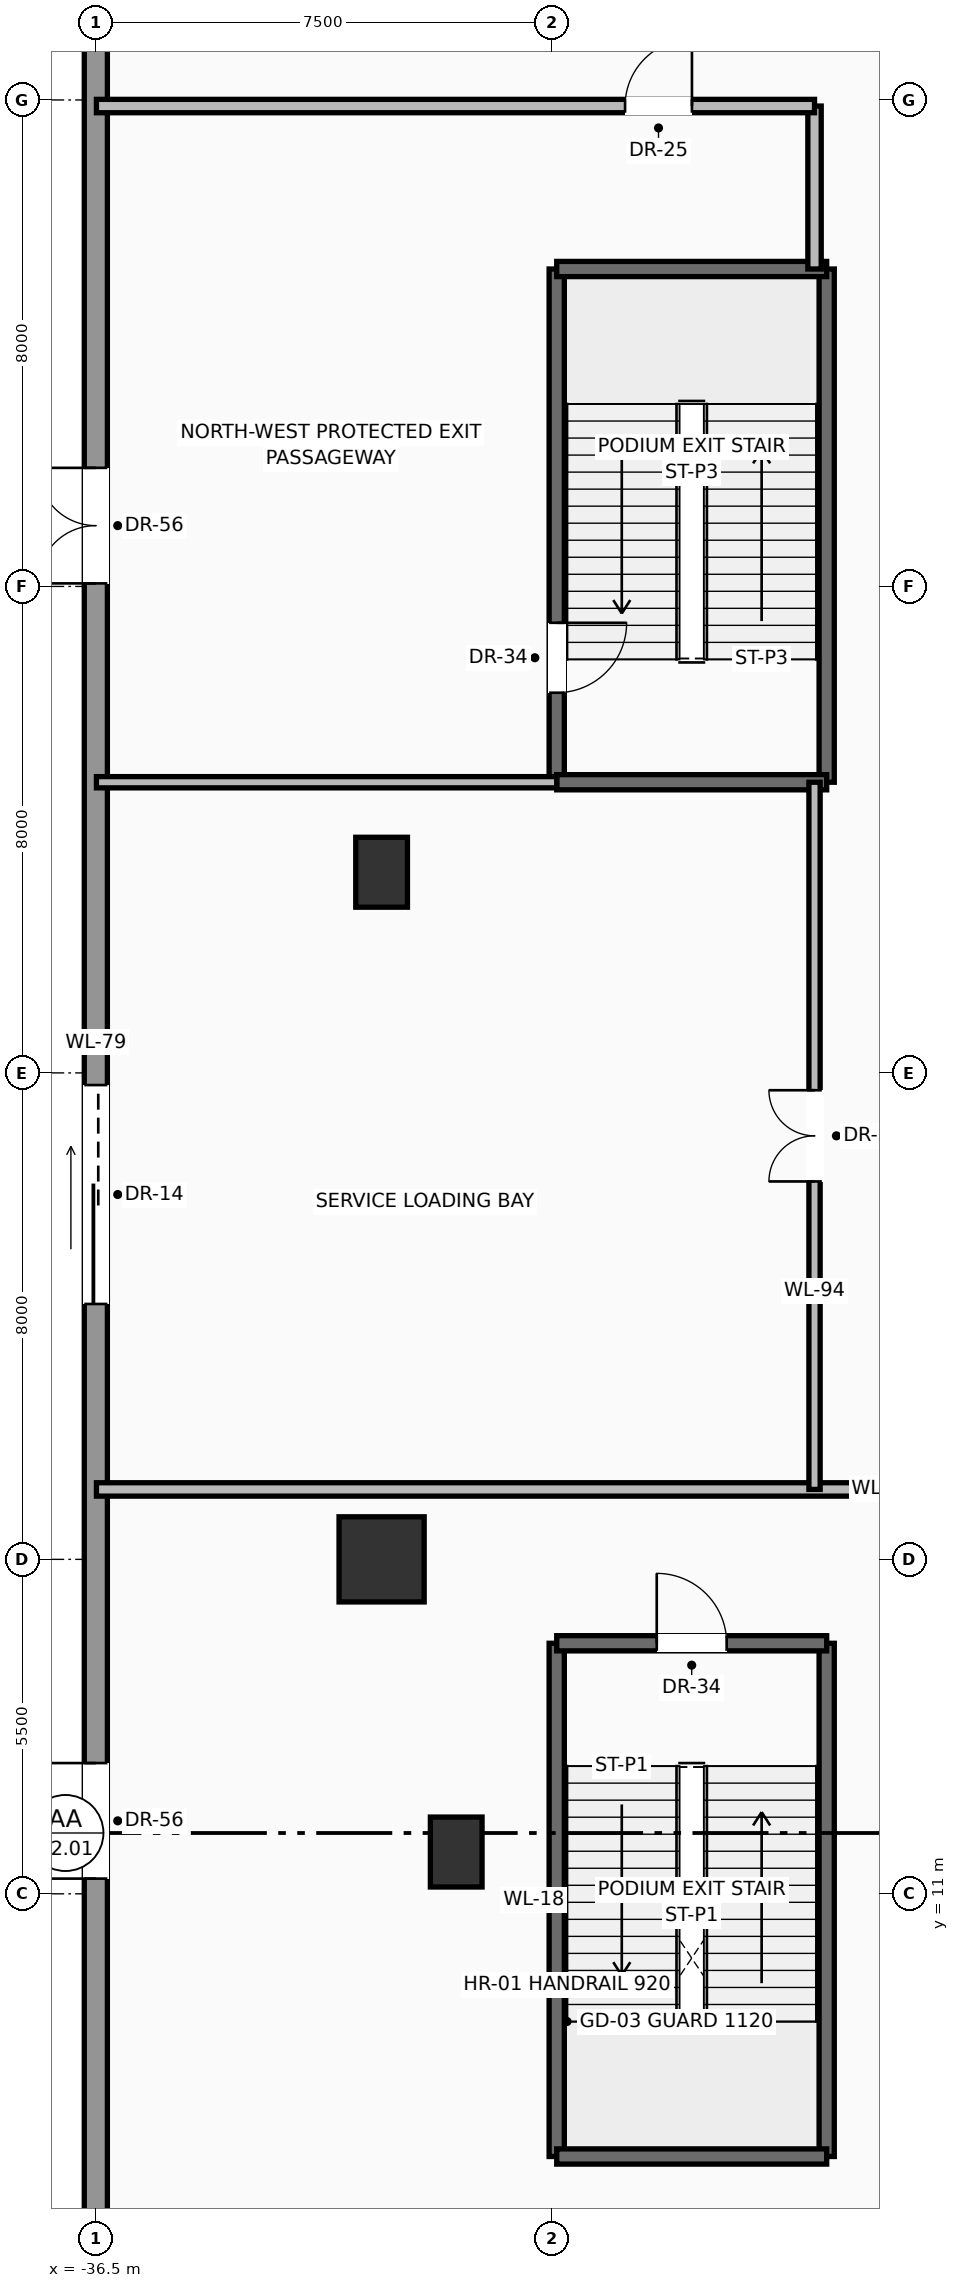
"""IFC4 building model, lengths in metres.
Left out: names, types, materials, properties, quantities, classifications, styles, units other than length and angle.
Written with IfcOpenShell. Run it as: python <this file> out.ifc"""

import sys

from ifc_helpers import new_model, si_unit, direction, frame, frame_2d, origin, origin_2d, place, context, subcontext, project, spatial, rectangle, hollow_rectangle, extrude, source, transform, mapped, element, fill, save


model = new_model("IFC4")
c1 = context("Model", 3, precision=1e-05, world=origin(), true_north=direction((0.0, 1.0)))
c2 = subcontext(c1, "Body", "Model", "MODEL_VIEW")
j1 = project(units=[si_unit("LENGTHUNIT", "METRE"), si_unit("PLANEANGLEUNIT", "RADIAN")], contexts=[c1])
p1 = place(None, origin())
s1 = spatial("IfcSite", under=j1, at=p1, CompositionType="ELEMENT")
p2 = place(p1, origin())
s2 = spatial("IfcBuilding", under=s1, at=p2, CompositionType="ELEMENT")
p3 = place(p2, origin())
s3 = spatial("IfcBuildingStorey", under=s2, at=p3, CompositionType="ELEMENT", Elevation=0.0)
m1 = source(origin(), c2, "Body", "SweptSolid", [
    extrude(hollow_rectangle(XDim=1.4, YDim=1.4, WallThickness=0.07, at=origin_2d()), origin(), (0.0, 0.0, 1.0), 5.5),
])
p4 = place(p3, frame((-31.8, 16.5, 0.0), z_axis=(0.0, 0.0, 1.0), x_axis=(1.0, 0.0, 0.0)))
e1 = element("IfcColumn", 1, at=p4, inside=s3, PredefinedType="COLUMN", context=c2, shape_type="MappedRepresentation", body=[
    mapped(m1, transform((0.0, 0.0, 0.0), scale=1.0)),
])
m2 = source(origin(), c2, "Body", "SweptSolid", [
    extrude(rectangle(XDim=0.85, YDim=1.15, at=origin_2d()), origin(), (0.0, 0.0, 1.0), 5.5),
])
for number, where, z_axis, x_axis in (
    (2, (-31.8, 27.8, 0.0), (0.0, 0.0, 1.0), (1.0, 0.0, 0.0)),
    (3, (-30.573, 11.687, 0.0), (0.0, 0.0, 1.0), (1.0, 0.0, 0.0)),
):
    element("IfcColumn", number, at=place(p3, frame(where, z_axis=z_axis, x_axis=x_axis)), inside=s3, PredefinedType="COLUMN", context=c2, shape_type="MappedRepresentation", body=[
        mapped(m2, transform((0.0, 0.0, 0.0), scale=1.0)),
    ])
p5 = place(p3, frame((-36.5, 4.0, 0.0), z_axis=(0.0, 0.0, 1.0), x_axis=(0.0, 1.0, 0.0)))
e4 = element("IfcWall", 4, at=p5, inside=s3, PredefinedType="SOLIDWALL", context=c2, shape_type="SweptSolid", body=[
    extrude(rectangle(XDim=42.0, YDim=0.38, at=frame_2d((21.0, 0.0))), origin(), (0.0, 0.0, 1.0), 4.09),
])
p6 = place(p5, frame((7.25, 0.0, 0.0)))
e5 = element("IfcOpeningElement", 5, at=p6, cuts=e4, PredefinedType="OPENING", context=c2, shape_type="SweptSolid", body=[
    extrude(rectangle(XDim=1.9, YDim=2.3, at=frame_2d((0.95, 1.15))), frame((0.0, 0.2, 0.0), z_axis=(0.0, -1.0, 0.0), x_axis=(1.0, 0.0, 0.0)), (0.0, 0.0, 1.0), 0.4),
])
p7 = place(p5, frame((28.55, 0.0, 0.0)))
e6 = element("IfcOpeningElement", 6, at=p7, cuts=e4, PredefinedType="OPENING", context=c2, shape_type="SweptSolid", body=[
    extrude(rectangle(XDim=1.9, YDim=2.3, at=frame_2d((0.95, 1.15))), frame((0.0, 0.2, 0.0), z_axis=(0.0, -1.0, 0.0), x_axis=(1.0, 0.0, 0.0)), (0.0, 0.0, 1.0), 0.4),
])
p8 = place(p5, frame((16.7, 0.0, 0.0)))
e7 = element("IfcOpeningElement", 7, at=p8, cuts=e4, PredefinedType="OPENING", context=c2, shape_type="SweptSolid", body=[
    extrude(rectangle(XDim=3.6, YDim=3.8, at=frame_2d((1.8, 1.9))), frame((0.0, 0.2, 0.0), z_axis=(0.0, -1.0, 0.0), x_axis=(1.0, 0.0, 0.0)), (0.0, 0.0, 1.0), 0.4),
])
for number, where, z_axis, x_axis in (
    (8, (-28.92, 6.68, 0.0), (0.0, 0.0, 1.0), (0.0, 1.0, 0.0)),
    (9, (-24.48, 6.68, 0.0), (0.0, 0.0, 1.0), (0.0, 1.0, 0.0)),
):
    element("IfcWall", number, at=place(p3, frame(where, z_axis=z_axis, x_axis=x_axis)), inside=s3, PredefinedType="SOLIDWALL", context=c2, shape_type="SweptSolid", body=[
        extrude(rectangle(XDim=8.44, YDim=0.25, at=frame_2d((4.22, 0.0))), origin(), (0.0, 0.0, 1.0), 5.15),
    ])
p9 = place(p3, frame((-24.48, 6.68, 0.0), z_axis=(0.0, 0.0, 1.0), x_axis=(-1.0, 0.0, 0.0)))
e10 = element("IfcWall", 10, at=p9, inside=s3, PredefinedType="SOLIDWALL", context=c2, shape_type="SweptSolid", body=[
    extrude(rectangle(XDim=4.44, YDim=0.25, at=frame_2d((2.22, 0.0))), origin(), (0.0, 0.0, 1.0), 5.15),
])
p10 = place(p3, frame((-28.92, 15.12, 0.0), z_axis=(0.0, 0.0, 1.0), x_axis=(1.0, 0.0, 0.0)))
e11 = element("IfcWall", 11, at=p10, inside=s3, PredefinedType="SOLIDWALL", context=c2, shape_type="SweptSolid", body=[
    extrude(rectangle(XDim=4.44, YDim=0.25, at=frame_2d((2.22, 0.0))), origin(), (0.0, 0.0, 1.0), 5.15),
])
p11 = place(p10, frame((1.645, 0.0, 0.0)))
e12 = element("IfcOpeningElement", 12, at=p11, cuts=e11, PredefinedType="OPENING", context=c2, shape_type="SweptSolid", body=[
    extrude(rectangle(XDim=1.15, YDim=2.2, at=frame_2d((0.575, 1.1))), frame((0.0, 0.135, 0.0), z_axis=(0.0, -1.0, 0.0), x_axis=(1.0, 0.0, 0.0)), (0.0, 0.0, 1.0), 0.27),
])
p12 = place(p3, frame((-28.92, 37.72, 0.0), z_axis=(0.0, 0.0, 1.0), x_axis=(0.0, -1.0, 0.0)))
e13 = element("IfcWall", 13, at=p12, inside=s3, PredefinedType="SOLIDWALL", context=c2, shape_type="SweptSolid", body=[
    extrude(rectangle(XDim=8.44, YDim=0.25, at=frame_2d((4.22, 0.0))), origin(), (0.0, 0.0, 1.0), 5.15),
])
p13 = place(p12, frame((5.818, 0.0, 0.0)))
e14 = element("IfcOpeningElement", 14, at=p13, cuts=e13, PredefinedType="OPENING", context=c2, shape_type="SweptSolid", body=[
    extrude(rectangle(XDim=1.15, YDim=2.2, at=frame_2d((0.575, 1.1))), frame((0.0, 0.135, 0.0), z_axis=(0.0, -1.0, 0.0), x_axis=(1.0, 0.0, 0.0)), (0.0, 0.0, 1.0), 0.27),
])
p14 = place(p3, frame((-24.48, 29.28, 0.0), z_axis=(0.0, 0.0, 1.0), x_axis=(0.0, 1.0, 0.0)))
e15 = element("IfcWall", 15, at=p14, inside=s3, PredefinedType="SOLIDWALL", context=c2, shape_type="SweptSolid", body=[
    extrude(rectangle(XDim=8.44, YDim=0.25, at=frame_2d((4.22, 0.0))), origin(), (0.0, 0.0, 1.0), 5.15),
])
for number, where, z_axis, x_axis in (
    (16, (-24.48, 29.28, 0.0), (0.0, 0.0, 1.0), (-1.0, 0.0, 0.0)),
    (17, (-28.92, 37.72, 0.0), (0.0, 0.0, 1.0), (1.0, 0.0, 0.0)),
):
    element("IfcWall", number, at=place(p3, frame(where, z_axis=z_axis, x_axis=x_axis)), inside=s3, PredefinedType="SOLIDWALL", context=c2, shape_type="SweptSolid", body=[
        extrude(rectangle(XDim=4.44, YDim=0.25, at=frame_2d((2.22, 0.0))), origin(), (0.0, 0.0, 1.0), 5.15),
    ])
p15 = place(p3, frame((-36.49, 17.65, 0.0), z_axis=(0.0, 0.0, 1.0), x_axis=(1.0, 0.0, 0.0)))
e18 = element("IfcWall", 18, at=p15, inside=s3, PredefinedType="SOLIDWALL", context=c2, shape_type="SweptSolid", body=[
    extrude(rectangle(XDim=25.84, YDim=0.22, at=frame_2d((12.92, 0.0))), origin(), (0.0, 0.0, 1.0), 4.102),
])
p16 = place(p15, frame((17.905, 0.0, 0.0)))
e19 = element("IfcOpeningElement", 19, at=p16, cuts=e18, PredefinedType="OPENING", context=c2, shape_type="SweptSolid", body=[
    extrude(rectangle(XDim=1.1, YDim=2.2, at=frame_2d((0.55, 1.1))), frame((0.0, 0.12, 0.0), z_axis=(0.0, -1.0, 0.0), x_axis=(1.0, 0.0, 0.0)), (0.0, 0.0, 1.0), 0.24),
])
p17 = place(p3, frame((-24.68, 17.65, 0.0), z_axis=(0.0, 0.0, 1.0), x_axis=(0.0, 1.0, 0.0)))
e20 = element("IfcWall", 20, at=p17, inside=s3, PredefinedType="PARTITIONING", context=c2, shape_type="SweptSolid", body=[
    extrude(rectangle(XDim=11.63, YDim=0.185, at=frame_2d((5.815, 0.0))), origin(), (0.0, 0.0, 1.0), 4.215),
])
p18 = place(p17, frame((5.065, 0.0, 0.0)))
e21 = element("IfcOpeningElement", 21, at=p18, cuts=e20, PredefinedType="OPENING", context=c2, shape_type="SweptSolid", body=[
    extrude(rectangle(XDim=1.5, YDim=2.25, at=frame_2d((0.75, 1.125))), frame((0.0, 0.103, 0.0), z_axis=(0.0, -1.0, 0.0), x_axis=(1.0, 0.0, 0.0)), (0.0, 0.0, 1.0), 0.205),
])
p19 = place(p3, frame((-36.49, 29.28, 0.0), z_axis=(0.0, 0.0, 1.0), x_axis=(1.0, 0.0, 0.0)))
e22 = element("IfcWall", 22, at=p19, inside=s3, PredefinedType="PARTITIONING", context=c2, shape_type="SweptSolid", body=[
    extrude(rectangle(XDim=7.57, YDim=0.185, at=frame_2d((3.785, 0.0))), origin(), (0.0, 0.0, 1.0), 5.142),
])
p20 = place(p3, frame((-24.68, 37.72, 0.0), z_axis=(0.0, 0.0, 1.0), x_axis=(0.0, 1.0, 0.0)))
e23 = element("IfcWall", 23, at=p20, inside=s3, PredefinedType="SOLIDWALL", context=c2, shape_type="SweptSolid", body=[
    extrude(rectangle(XDim=2.68, YDim=0.22, at=frame_2d((1.34, 0.0))), origin(), (0.0, 0.0, 1.0), 5.142),
])
p21 = place(p3, frame((-36.49, 40.4, 0.0), z_axis=(0.0, 0.0, 1.0), x_axis=(1.0, 0.0, 0.0)))
e24 = element("IfcWall", 24, at=p21, inside=s3, PredefinedType="SOLIDWALL", context=c2, shape_type="SweptSolid", body=[
    extrude(rectangle(XDim=11.81, YDim=0.22, at=frame_2d((5.905, 0.0))), origin(), (0.0, 0.0, 1.0), 5.142),
])
p22 = place(p21, frame((8.694, 0.0, 0.0)))
e25 = element("IfcOpeningElement", 25, at=p22, cuts=e24, PredefinedType="OPENING", context=c2, shape_type="SweptSolid", body=[
    extrude(rectangle(XDim=1.1, YDim=2.2, at=frame_2d((0.55, 1.1))), frame((0.0, 0.12, 0.0), z_axis=(0.0, -1.0, 0.0), x_axis=(1.0, 0.0, 0.0)), (0.0, 0.0, 1.0), 0.24),
])
m3 = source(origin(), c2, "Body", "SweptSolid", [
    extrude(rectangle(XDim=1.9, YDim=2.3, at=frame_2d((0.95, 1.15))), frame((0.0, 0.025, 0.0), z_axis=(0.0, -1.0, 0.0), x_axis=(1.0, 0.0, 0.0)), (0.0, 0.0, 1.0), 0.05),
])
p23 = place(p6, origin())
e26 = element("IfcDoor", 26, at=p23, inside=s3, OperationType="DOUBLE_DOOR_SINGLE_SWING", PredefinedType="DOOR", context=c2, shape_type="MappedRepresentation", body=[
    mapped(m3, transform((0.0, 0.0, 0.0), scale=1.0)),
])
fill(e5, e26)
p24 = place(p7, origin())
e27 = element("IfcDoor", 27, at=p24, inside=s3, OperationType="DOUBLE_DOOR_SINGLE_SWING", PredefinedType="DOOR", context=c2, shape_type="MappedRepresentation", body=[
    mapped(m3, transform((0.0, 0.0, 0.0), scale=1.0)),
])
fill(e6, e27)
m4 = source(origin(), c2, "Body", "SweptSolid", [
    extrude(rectangle(XDim=3.6, YDim=3.8, at=frame_2d((1.8, 1.9))), frame((0.0, 0.025, 0.0), z_axis=(0.0, -1.0, 0.0), x_axis=(1.0, 0.0, 0.0)), (0.0, 0.0, 1.0), 0.05),
])
p25 = place(p8, origin())
e28 = element("IfcDoor", 28, at=p25, inside=s3, OperationType="FOLDING_TO_LEFT", PredefinedType="GATE", context=c2, shape_type="MappedRepresentation", body=[
    mapped(m4, transform((0.0, 0.0, 0.0), scale=1.0)),
])
fill(e7, e28)
m5 = source(origin(), c2, "Body", "SweptSolid", [
    extrude(rectangle(XDim=1.15, YDim=2.2, at=frame_2d((0.575, 1.1))), frame((0.0, 0.025, 0.0), z_axis=(0.0, -1.0, 0.0), x_axis=(1.0, 0.0, 0.0)), (0.0, 0.0, 1.0), 0.05),
])
p26 = place(p11, origin())
e29 = element("IfcDoor", 29, at=p26, inside=s3, OperationType="SINGLE_SWING_LEFT", PredefinedType="DOOR", context=c2, shape_type="MappedRepresentation", body=[
    mapped(m5, transform((0.0, 0.0, 0.0), scale=1.0)),
])
fill(e12, e29)
p27 = place(p13, origin())
e30 = element("IfcDoor", 30, at=p27, inside=s3, OperationType="SINGLE_SWING_LEFT", PredefinedType="DOOR", context=c2, shape_type="MappedRepresentation", body=[
    mapped(m5, transform((0.0, 0.0, 0.0), scale=1.0)),
])
fill(e14, e30)
m6 = source(origin(), c2, "Body", "SweptSolid", [
    extrude(rectangle(XDim=1.5, YDim=2.25, at=frame_2d((0.75, 1.125))), frame((0.0, 0.025, 0.0), z_axis=(0.0, -1.0, 0.0), x_axis=(1.0, 0.0, 0.0)), (0.0, 0.0, 1.0), 0.05),
])
p28 = place(p18, origin())
e31 = element("IfcDoor", 31, at=p28, inside=s3, OperationType="DOUBLE_DOOR_SINGLE_SWING", PredefinedType="DOOR", context=c2, shape_type="MappedRepresentation", body=[
    mapped(m6, transform((0.0, 0.0, 0.0), scale=1.0)),
])
fill(e21, e31)
m7 = source(origin(), c2, "Body", "SweptSolid", [
    extrude(rectangle(XDim=1.1, YDim=2.2, at=frame_2d((0.55, 1.1))), frame((0.0, 0.025, 0.0), z_axis=(0.0, -1.0, 0.0), x_axis=(1.0, 0.0, 0.0)), (0.0, 0.0, 1.0), 0.05),
])
p29 = place(p22, origin())
e32 = element("IfcDoor", 32, at=p29, inside=s3, OperationType="SINGLE_SWING_RIGHT", PredefinedType="DOOR", context=c2, shape_type="MappedRepresentation", body=[
    mapped(m7, transform((0.0, 0.0, 0.0), scale=1.0)),
])
fill(e25, e32)
save(model, sys.argv[1])
